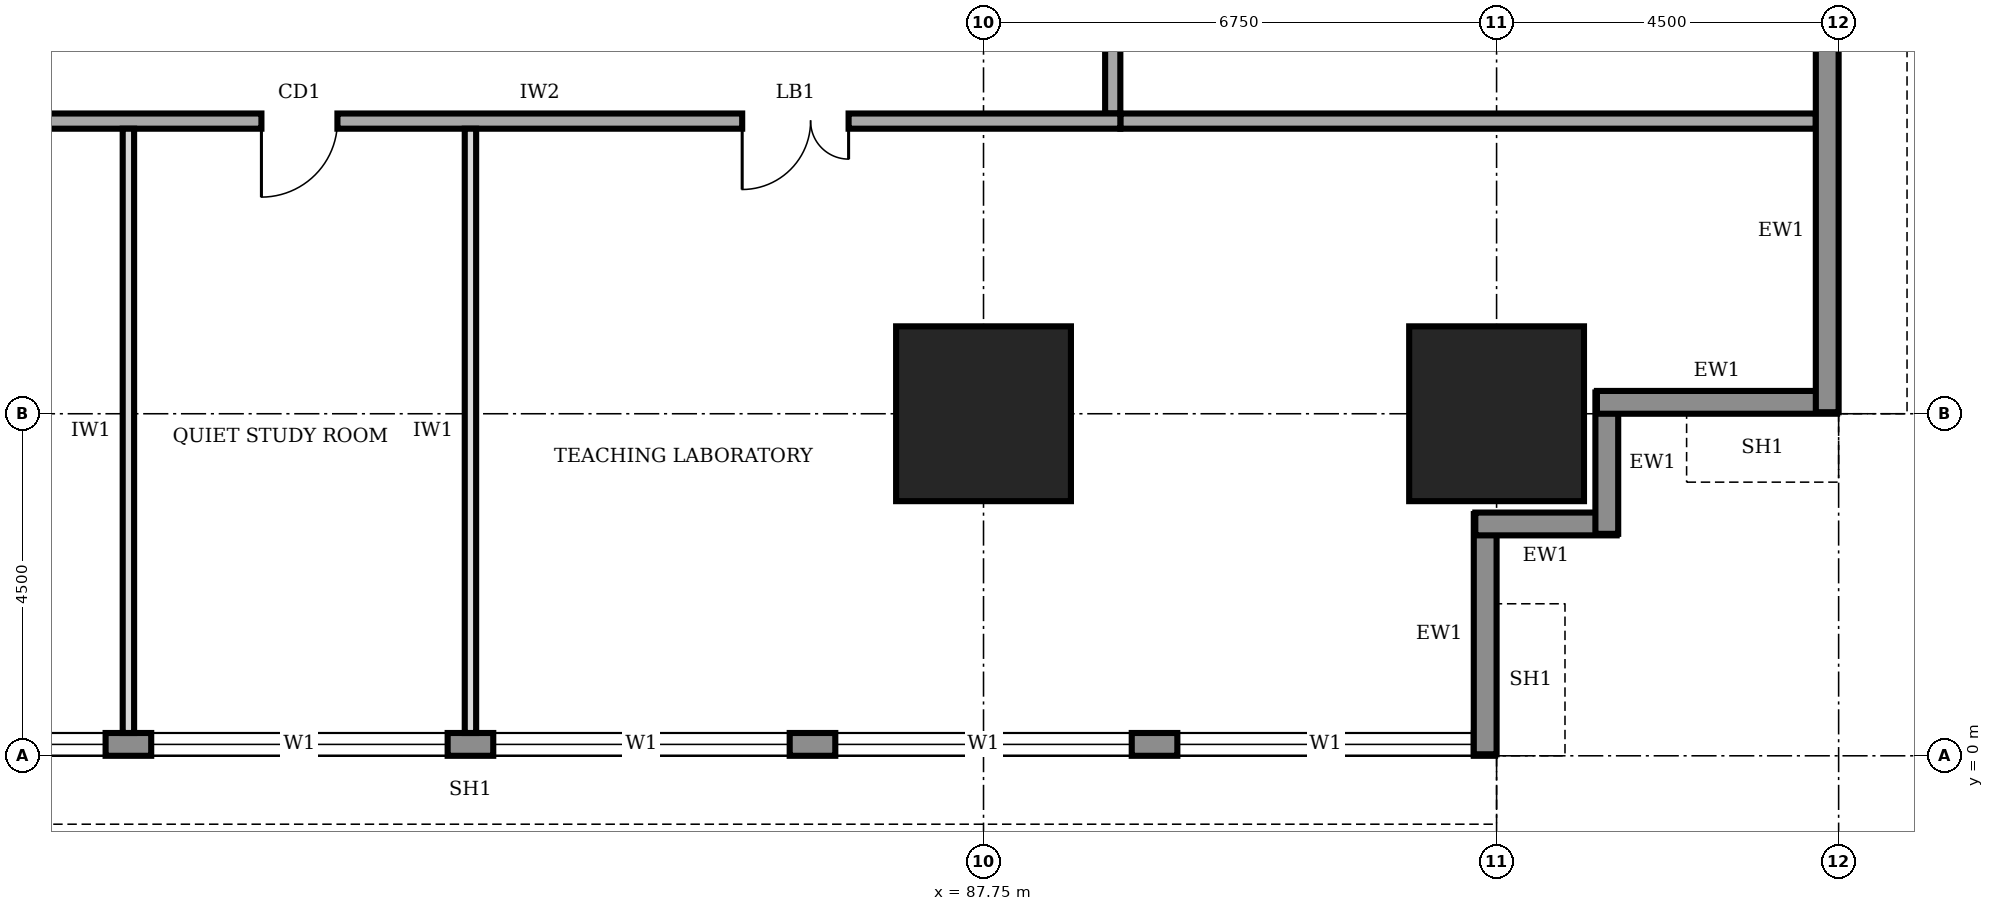
"""IFC4 building model, lengths in metres.
Left out: names, types, materials, properties, quantities, classifications, styles, units other than length and angle.
Written with IfcOpenShell. Run it as: python <this file> out.ifc"""

import sys

from ifc_helpers import new_model, si_unit, direction, frame, frame_2d, origin, origin_2d, place, context, subcontext, project, spatial, rectangle, extrude, element, fill, save


model = new_model("IFC4")
c1 = context("Model", 3, precision=1e-05, world=origin(), true_north=direction((0.0, 1.0)))
c2 = subcontext(c1, "Body", "Model", "MODEL_VIEW")
j1 = project(units=[si_unit("LENGTHUNIT", "METRE"), si_unit("PLANEANGLEUNIT", "RADIAN")], contexts=[c1])
p1 = place(None, origin())
s1 = spatial("IfcSite", under=j1, at=p1, CompositionType="ELEMENT")
p2 = place(p1, origin())
s2 = spatial("IfcBuilding", under=s1, at=p2, CompositionType="ELEMENT")
p3 = place(p2, frame((0.0, 0.0, 45.0)))
s3 = spatial("IfcBuildingStorey", under=s2, at=p3, CompositionType="ELEMENT", Elevation=45.0)
for number, where, z_axis, x_axis in (
    (1, (87.75, 4.5, 0.0), (0.0, 0.0, 1.0), (1.0, 0.0, 0.0)),
    (2, (94.5, 4.5, 0.0), (0.0, 0.0, 1.0), (1.0, 0.0, 0.0)),
):
    element("IfcColumn", number, at=place(p3, frame(where, z_axis=z_axis, x_axis=x_axis)), inside=s3, PredefinedType="COLUMN", context=c2, shape_type="SweptSolid", body=[
        extrude(rectangle(XDim=2.3, YDim=2.3, at=origin_2d()), origin(), (0.0, 0.0, 1.0), 4.0),
    ])
p4 = place(p3, frame((67.52, 0.15, 0.0), z_axis=(0.0, 0.0, 1.0), x_axis=(1.0, 0.0, 0.0)))
e3 = element("IfcWall", 3, at=p4, inside=s3, PredefinedType="STANDARD", context=c2, shape_type="SweptSolid", body=[
    extrude(rectangle(XDim=26.96, YDim=0.3, at=frame_2d((13.48, 0.0))), origin(), (0.0, 0.0, 1.0), 3.75),
])
p5 = place(p4, frame((4.78, 0.0, 0.9)))
e4 = element("IfcOpeningElement", 4, at=p5, cuts=e3, PredefinedType="OPENING", context=c2, shape_type="SweptSolid", body=[
    extrude(rectangle(XDim=3.9, YDim=2.2, at=frame_2d((1.95, 1.1))), frame((0.0, 0.16, 0.0), z_axis=(0.0, -1.0, 0.0), x_axis=(1.0, 0.0, 0.0)), (0.0, 0.0, 1.0), 0.32),
])
p6 = place(p4, frame((9.28, 0.0, 0.9)))
e5 = element("IfcOpeningElement", 5, at=p6, cuts=e3, PredefinedType="OPENING", context=c2, shape_type="SweptSolid", body=[
    extrude(rectangle(XDim=3.9, YDim=2.2, at=frame_2d((1.95, 1.1))), frame((0.0, 0.16, 0.0), z_axis=(0.0, -1.0, 0.0), x_axis=(1.0, 0.0, 0.0)), (0.0, 0.0, 1.0), 0.32),
])
p7 = place(p4, frame((13.78, 0.0, 0.9)))
e6 = element("IfcOpeningElement", 6, at=p7, cuts=e3, PredefinedType="OPENING", context=c2, shape_type="SweptSolid", body=[
    extrude(rectangle(XDim=3.9, YDim=2.2, at=frame_2d((1.95, 1.1))), frame((0.0, 0.16, 0.0), z_axis=(0.0, -1.0, 0.0), x_axis=(1.0, 0.0, 0.0)), (0.0, 0.0, 1.0), 0.32),
])
p8 = place(p4, frame((18.28, 0.0, 0.9)))
e7 = element("IfcOpeningElement", 7, at=p8, cuts=e3, PredefinedType="OPENING", context=c2, shape_type="SweptSolid", body=[
    extrude(rectangle(XDim=3.9, YDim=2.2, at=frame_2d((1.95, 1.1))), frame((0.0, 0.16, 0.0), z_axis=(0.0, -1.0, 0.0), x_axis=(1.0, 0.0, 0.0)), (0.0, 0.0, 1.0), 0.32),
])
p9 = place(p4, frame((22.78, 0.0, 0.9)))
e8 = element("IfcOpeningElement", 8, at=p9, cuts=e3, PredefinedType="OPENING", context=c2, shape_type="SweptSolid", body=[
    extrude(rectangle(XDim=3.9, YDim=2.2, at=frame_2d((1.95, 1.1))), frame((0.0, 0.16, 0.0), z_axis=(0.0, -1.0, 0.0), x_axis=(1.0, 0.0, 0.0)), (0.0, 0.0, 1.0), 0.32),
])
p10 = place(p3, frame((94.35, 0.02, 0.0), z_axis=(0.0, 0.0, 1.0), x_axis=(0.0, 1.0, 0.0)))
e9 = element("IfcWall", 9, at=p10, inside=s3, PredefinedType="STANDARD", context=c2, shape_type="SweptSolid", body=[
    extrude(rectangle(XDim=3.16, YDim=0.3, at=frame_2d((1.58, 0.0))), origin(), (0.0, 0.0, 1.0), 2.85),
])
for number, where, z_axis, x_axis in (
    (10, (94.22, 3.05, 0.0), (0.0, 0.0, 1.0), (1.0, 0.0, 0.0)),
    (11, (95.95, 2.92, 0.0), (0.0, 0.0, 1.0), (0.0, 1.0, 0.0)),
):
    element("IfcWall", number, at=place(p3, frame(where, z_axis=z_axis, x_axis=x_axis)), inside=s3, PredefinedType="STANDARD", context=c2, shape_type="SweptSolid", body=[
        extrude(rectangle(XDim=1.86, YDim=0.3, at=frame_2d((0.93, 0.0))), origin(), (0.0, 0.0, 1.0), 3.75),
    ])
p11 = place(p3, frame((95.82, 4.65, 0.0), z_axis=(0.0, 0.0, 1.0), x_axis=(1.0, 0.0, 0.0)))
e12 = element("IfcWall", 12, at=p11, inside=s3, PredefinedType="STANDARD", context=c2, shape_type="SweptSolid", body=[
    extrude(rectangle(XDim=3.16, YDim=0.3, at=frame_2d((1.58, 0.0))), origin(), (0.0, 0.0, 1.0), 2.85),
])
p12 = place(p3, frame((98.85, 4.52, 0.0), z_axis=(0.0, 0.0, 1.0), x_axis=(0.0, 1.0, 0.0)))
e13 = element("IfcWall", 13, at=p12, inside=s3, PredefinedType="STANDARD", context=c2, shape_type="SweptSolid", body=[
    extrude(rectangle(XDim=31.46, YDim=0.3, at=frame_2d((15.73, 0.0))), origin(), (0.0, 0.0, 1.0), 3.75),
])
p13 = place(p12, frame((4.78, 0.0, 0.9)))
e14 = element("IfcOpeningElement", 14, at=p13, cuts=e13, PredefinedType="OPENING", context=c2, shape_type="SweptSolid", body=[
    extrude(rectangle(XDim=3.9, YDim=2.2, at=frame_2d((1.95, 1.1))), frame((0.0, 0.16, 0.0), z_axis=(0.0, -1.0, 0.0), x_axis=(1.0, 0.0, 0.0)), (0.0, 0.0, 1.0), 0.32),
])
p14 = place(p12, frame((9.28, 0.0, 0.9)))
e15 = element("IfcOpeningElement", 15, at=p14, cuts=e13, PredefinedType="OPENING", context=c2, shape_type="SweptSolid", body=[
    extrude(rectangle(XDim=3.9, YDim=2.2, at=frame_2d((1.95, 1.1))), frame((0.0, 0.16, 0.0), z_axis=(0.0, -1.0, 0.0), x_axis=(1.0, 0.0, 0.0)), (0.0, 0.0, 1.0), 0.32),
])
p15 = place(p12, frame((13.78, 0.0, 0.9)))
e16 = element("IfcOpeningElement", 16, at=p15, cuts=e13, PredefinedType="OPENING", context=c2, shape_type="SweptSolid", body=[
    extrude(rectangle(XDim=3.9, YDim=2.2, at=frame_2d((1.95, 1.1))), frame((0.0, 0.16, 0.0), z_axis=(0.0, -1.0, 0.0), x_axis=(1.0, 0.0, 0.0)), (0.0, 0.0, 1.0), 0.32),
])
p16 = place(p12, frame((18.28, 0.0, 0.9)))
e17 = element("IfcOpeningElement", 17, at=p16, cuts=e13, PredefinedType="OPENING", context=c2, shape_type="SweptSolid", body=[
    extrude(rectangle(XDim=3.9, YDim=2.2, at=frame_2d((1.95, 1.1))), frame((0.0, 0.16, 0.0), z_axis=(0.0, -1.0, 0.0), x_axis=(1.0, 0.0, 0.0)), (0.0, 0.0, 1.0), 0.32),
])
p17 = place(p12, frame((22.78, 0.0, 0.9)))
e18 = element("IfcOpeningElement", 18, at=p17, cuts=e13, PredefinedType="OPENING", context=c2, shape_type="SweptSolid", body=[
    extrude(rectangle(XDim=3.9, YDim=2.2, at=frame_2d((1.95, 1.1))), frame((0.0, 0.16, 0.0), z_axis=(0.0, -1.0, 0.0), x_axis=(1.0, 0.0, 0.0)), (0.0, 0.0, 1.0), 0.32),
])
p18 = place(p12, frame((27.28, 0.0, 0.9)))
e19 = element("IfcOpeningElement", 19, at=p18, cuts=e13, PredefinedType="OPENING", context=c2, shape_type="SweptSolid", body=[
    extrude(rectangle(XDim=3.9, YDim=2.2, at=frame_2d((1.95, 1.1))), frame((0.0, 0.16, 0.0), z_axis=(0.0, -1.0, 0.0), x_axis=(1.0, 0.0, 0.0)), (0.0, 0.0, 1.0), 0.32),
])
p19 = place(p3, frame((72.65, 8.35, 0.0), z_axis=(0.0, 0.0, 1.0), x_axis=(1.0, 0.0, 0.0)))
e20 = element("IfcWall", 20, at=p19, inside=s3, PredefinedType="SOLIDWALL", context=c2, shape_type="SweptSolid", body=[
    extrude(rectangle(XDim=16.9, YDim=0.2, at=frame_2d((8.45, 0.0))), origin(), (0.0, 0.0, 1.0), 3.75),
])
p20 = place(p19, frame((1.325, 0.0, 0.0)))
e21 = element("IfcOpeningElement", 21, at=p20, cuts=e20, PredefinedType="OPENING", context=c2, shape_type="SweptSolid", body=[
    extrude(rectangle(XDim=1.0, YDim=2.1, at=frame_2d((0.5, 1.05))), frame((0.0, 0.11, 0.0), z_axis=(0.0, -1.0, 0.0), x_axis=(1.0, 0.0, 0.0)), (0.0, 0.0, 1.0), 0.22),
])
p21 = place(p19, frame((5.6, 0.0, 0.0)))
e22 = element("IfcOpeningElement", 22, at=p21, cuts=e20, PredefinedType="OPENING", context=c2, shape_type="SweptSolid", body=[
    extrude(rectangle(XDim=1.0, YDim=2.1, at=frame_2d((0.5, 1.05))), frame((0.0, 0.11, 0.0), z_axis=(0.0, -1.0, 0.0), x_axis=(1.0, 0.0, 0.0)), (0.0, 0.0, 1.0), 0.22),
])
p22 = place(p19, frame((11.925, 0.0, 0.0)))
e23 = element("IfcOpeningElement", 23, at=p22, cuts=e20, PredefinedType="OPENING", context=c2, shape_type="SweptSolid", body=[
    extrude(rectangle(XDim=1.4, YDim=2.1, at=frame_2d((0.7, 1.05))), frame((0.0, 0.11, 0.0), z_axis=(0.0, -1.0, 0.0), x_axis=(1.0, 0.0, 0.0)), (0.0, 0.0, 1.0), 0.22),
])
p23 = place(p3, frame((89.45, 8.45, 0.0), z_axis=(0.0, 0.0, 1.0), x_axis=(0.0, 1.0, 0.0)))
e24 = element("IfcWall", 24, at=p23, inside=s3, PredefinedType="SOLIDWALL", context=c2, shape_type="SweptSolid", body=[
    extrude(rectangle(XDim=23.8, YDim=0.2, at=frame_2d((11.9, 0.0))), origin(), (0.0, 0.0, 1.0), 3.75),
])
p24 = place(p23, frame((1.925, 0.0, 0.0)))
e25 = element("IfcOpeningElement", 25, at=p24, cuts=e24, PredefinedType="OPENING", context=c2, shape_type="SweptSolid", body=[
    extrude(rectangle(XDim=1.0, YDim=2.1, at=frame_2d((0.5, 1.05))), frame((0.0, 0.11, 0.0), z_axis=(0.0, -1.0, 0.0), x_axis=(1.0, 0.0, 0.0)), (0.0, 0.0, 1.0), 0.22),
])
p25 = place(p23, frame((6.3, 0.0, 0.0)))
e26 = element("IfcOpeningElement", 26, at=p25, cuts=e24, PredefinedType="OPENING", context=c2, shape_type="SweptSolid", body=[
    extrude(rectangle(XDim=0.9, YDim=2.1, at=frame_2d((0.45, 1.05))), frame((0.0, 0.11, 0.0), z_axis=(0.0, -1.0, 0.0), x_axis=(1.0, 0.0, 0.0)), (0.0, 0.0, 1.0), 0.22),
])
p26 = place(p23, frame((11.1, 0.0, 0.0)))
e27 = element("IfcOpeningElement", 27, at=p26, cuts=e24, PredefinedType="OPENING", context=c2, shape_type="SweptSolid", body=[
    extrude(rectangle(XDim=0.9, YDim=2.1, at=frame_2d((0.45, 1.05))), frame((0.0, 0.11, 0.0), z_axis=(0.0, -1.0, 0.0), x_axis=(1.0, 0.0, 0.0)), (0.0, 0.0, 1.0), 0.22),
])
p27 = place(p23, frame((14.15, 0.0, 0.0)))
e28 = element("IfcOpeningElement", 28, at=p27, cuts=e24, PredefinedType="OPENING", context=c2, shape_type="SweptSolid", body=[
    extrude(rectangle(XDim=0.9, YDim=2.1, at=frame_2d((0.45, 1.05))), frame((0.0, 0.11, 0.0), z_axis=(0.0, -1.0, 0.0), x_axis=(1.0, 0.0, 0.0)), (0.0, 0.0, 1.0), 0.22),
])
p28 = place(p23, frame((17.05, 0.0, 0.0)))
e29 = element("IfcOpeningElement", 29, at=p28, cuts=e24, PredefinedType="OPENING", context=c2, shape_type="SweptSolid", body=[
    extrude(rectangle(XDim=1.0, YDim=2.1, at=frame_2d((0.5, 1.05))), frame((0.0, 0.11, 0.0), z_axis=(0.0, -1.0, 0.0), x_axis=(1.0, 0.0, 0.0)), (0.0, 0.0, 1.0), 0.22),
])
p29 = place(p23, frame((8.95, 0.0, 0.0)))
e30 = element("IfcOpeningElement", 30, at=p29, cuts=e24, PredefinedType="OPENING", context=c2, shape_type="SweptSolid", body=[
    extrude(rectangle(XDim=1.0, YDim=2.1, at=frame_2d((0.5, 1.05))), frame((0.0, 0.11, 0.0), z_axis=(0.0, -1.0, 0.0), x_axis=(1.0, 0.0, 0.0)), (0.0, 0.0, 1.0), 0.22),
])
p30 = place(p23, frame((20.675, 0.0, 0.0)))
e31 = element("IfcOpeningElement", 31, at=p30, cuts=e24, PredefinedType="OPENING", context=c2, shape_type="SweptSolid", body=[
    extrude(rectangle(XDim=1.0, YDim=2.1, at=frame_2d((0.5, 1.05))), frame((0.0, 0.11, 0.0), z_axis=(0.0, -1.0, 0.0), x_axis=(1.0, 0.0, 0.0)), (0.0, 0.0, 1.0), 0.22),
])
p31 = place(p3, frame((89.55, 8.35, 0.0), z_axis=(0.0, 0.0, 1.0), x_axis=(1.0, 0.0, 0.0)))
e32 = element("IfcWall", 32, at=p31, inside=s3, PredefinedType="SOLIDWALL", context=c2, shape_type="SweptSolid", body=[
    extrude(rectangle(XDim=9.15, YDim=0.2, at=frame_2d((4.575, 0.0))), origin(), (0.0, 0.0, 1.0), 3.75),
])
for number, where, z_axis, x_axis in (
    (33, (76.5, 0.3, 0.0), (0.0, 0.0, 1.0), (0.0, 1.0, 0.0)),
    (34, (81.0, 0.3, 0.0), (0.0, 0.0, 1.0), (0.0, 1.0, 0.0)),
):
    element("IfcWall", number, at=place(p3, frame(where, z_axis=z_axis, x_axis=x_axis)), inside=s3, PredefinedType="PARTITIONING", context=c2, shape_type="SweptSolid", body=[
        extrude(rectangle(XDim=7.95, YDim=0.15, at=frame_2d((3.975, 0.0))), origin(), (0.0, 0.0, 1.0), 3.75),
    ])
p32 = place(p5, origin())
e35 = element("IfcWindow", 35, at=p32, inside=s3, PartitioningType="SINGLE_PANEL", PredefinedType="WINDOW", context=c2, shape_type="SweptSolid", body=[
    extrude(rectangle(XDim=3.9, YDim=2.2, at=frame_2d((1.95, 1.1))), frame((0.0, 0.03, 0.0), z_axis=(0.0, -1.0, 0.0), x_axis=(1.0, 0.0, 0.0)), (0.0, 0.0, 1.0), 0.06),
])
fill(e4, e35)
p33 = place(p6, origin())
e36 = element("IfcWindow", 36, at=p33, inside=s3, PartitioningType="SINGLE_PANEL", PredefinedType="WINDOW", context=c2, shape_type="SweptSolid", body=[
    extrude(rectangle(XDim=3.9, YDim=2.2, at=frame_2d((1.95, 1.1))), frame((0.0, 0.03, 0.0), z_axis=(0.0, -1.0, 0.0), x_axis=(1.0, 0.0, 0.0)), (0.0, 0.0, 1.0), 0.06),
])
fill(e5, e36)
p34 = place(p7, origin())
e37 = element("IfcWindow", 37, at=p34, inside=s3, PartitioningType="SINGLE_PANEL", PredefinedType="WINDOW", context=c2, shape_type="SweptSolid", body=[
    extrude(rectangle(XDim=3.9, YDim=2.2, at=frame_2d((1.95, 1.1))), frame((0.0, 0.03, 0.0), z_axis=(0.0, -1.0, 0.0), x_axis=(1.0, 0.0, 0.0)), (0.0, 0.0, 1.0), 0.06),
])
fill(e6, e37)
p35 = place(p8, origin())
e38 = element("IfcWindow", 38, at=p35, inside=s3, PartitioningType="SINGLE_PANEL", PredefinedType="WINDOW", context=c2, shape_type="SweptSolid", body=[
    extrude(rectangle(XDim=3.9, YDim=2.2, at=frame_2d((1.95, 1.1))), frame((0.0, 0.03, 0.0), z_axis=(0.0, -1.0, 0.0), x_axis=(1.0, 0.0, 0.0)), (0.0, 0.0, 1.0), 0.06),
])
fill(e7, e38)
p36 = place(p9, origin())
e39 = element("IfcWindow", 39, at=p36, inside=s3, PartitioningType="SINGLE_PANEL", PredefinedType="WINDOW", context=c2, shape_type="SweptSolid", body=[
    extrude(rectangle(XDim=3.9, YDim=2.2, at=frame_2d((1.95, 1.1))), frame((0.0, 0.03, 0.0), z_axis=(0.0, -1.0, 0.0), x_axis=(1.0, 0.0, 0.0)), (0.0, 0.0, 1.0), 0.06),
])
fill(e8, e39)
p37 = place(p21, frame((1.0, 0.0, 0.0), z_axis=(0.0, 0.0, 1.0), x_axis=(-1.0, 0.0, 0.0)))
e40 = element("IfcDoor", 40, at=p37, inside=s3, OperationType="SINGLE_SWING_RIGHT", PredefinedType="DOOR", context=c2, shape_type="SweptSolid", body=[
    extrude(rectangle(XDim=1.0, YDim=2.1, at=frame_2d((0.5, 1.05))), frame((0.0, 0.025, 0.0), z_axis=(0.0, -1.0, 0.0), x_axis=(1.0, 0.0, 0.0)), (0.0, 0.0, 1.0), 0.05),
])
fill(e22, e40)
p38 = place(p22, frame((1.4, 0.0, 0.0), z_axis=(0.0, 0.0, 1.0), x_axis=(-1.0, 0.0, 0.0)))
e41 = element("IfcDoor", 41, at=p38, inside=s3, OperationType="DOUBLE_DOOR_SINGLE_SWING", PredefinedType="DOOR", context=c2, shape_type="SweptSolid", body=[
    extrude(rectangle(XDim=1.4, YDim=2.1, at=frame_2d((0.7, 1.05))), frame((0.0, 0.025, 0.0), z_axis=(0.0, -1.0, 0.0), x_axis=(1.0, 0.0, 0.0)), (0.0, 0.0, 1.0), 0.05),
])
fill(e23, e41)
save(model, sys.argv[1])
